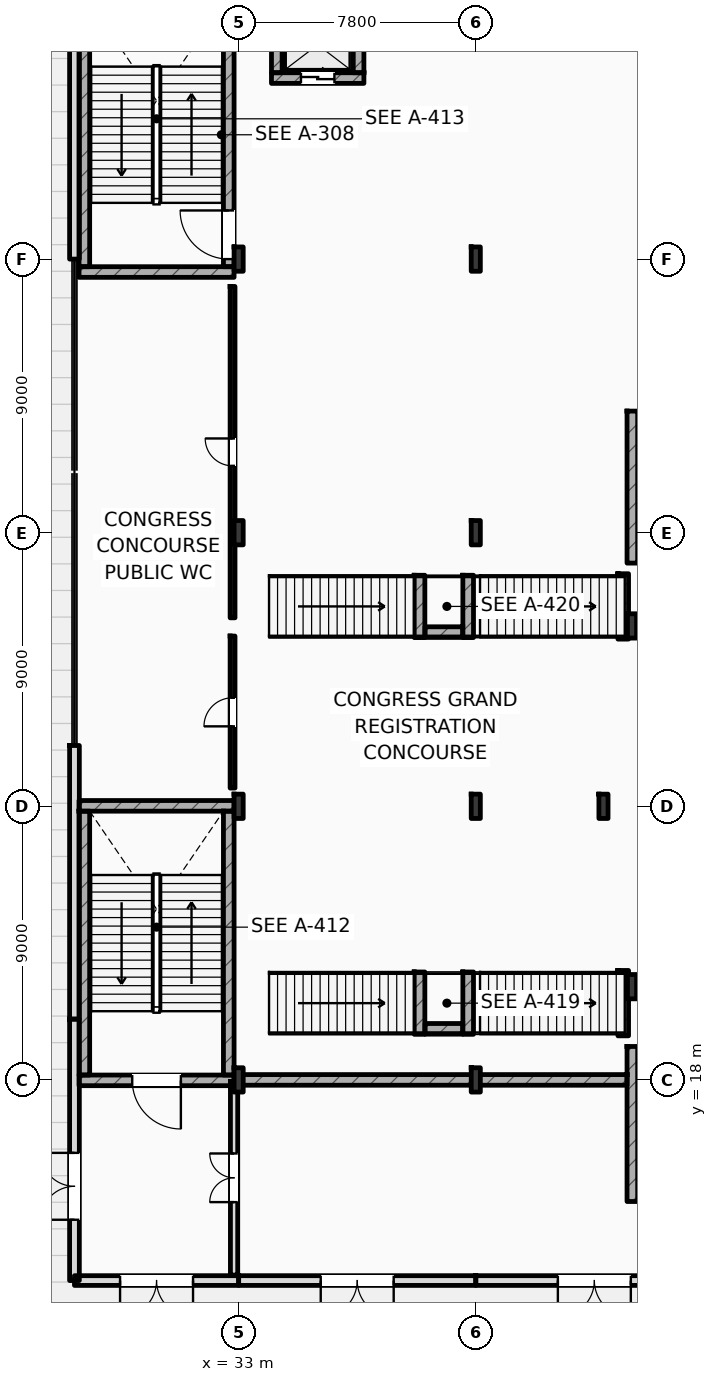
"""IFC4 building model, lengths in metres.
Left out: names, types, materials, properties, quantities, classifications, styles, units other than length and angle.
Written with IfcOpenShell. Run it as: python <this file> out.ifc"""

import sys

from ifc_helpers import new_model, si_unit, direction, frame, frame_2d, origin, origin_2d, place, context, subcontext, project, spatial, rectangle, i_section, extrude, element, fill, save


model = new_model("IFC4")
c1 = context("Model", 3, precision=1e-05, world=origin(), true_north=direction((0.0, 1.0)))
c2 = subcontext(c1, "Body", "Model", "MODEL_VIEW")
j1 = project(units=[si_unit("LENGTHUNIT", "METRE"), si_unit("PLANEANGLEUNIT", "RADIAN")], contexts=[c1])
p1 = place(None, origin())
s1 = spatial("IfcSite", under=j1, at=p1, CompositionType="ELEMENT")
p2 = place(p1, origin())
s2 = spatial("IfcBuilding", under=s1, at=p2, CompositionType="ELEMENT")
p3 = place(p2, origin())
s3 = spatial("IfcBuildingStorey", under=s2, at=p3, CompositionType="ELEMENT", Elevation=0.0)
for number, where, z_axis, x_axis in (
    (1, (33.0, 18.0, 0.0), (0.0, 0.0, 1.0), (1.0, 0.0, 0.0)),
    (2, (33.0, 27.0, 0.0), (0.0, 0.0, 1.0), (1.0, 0.0, 0.0)),
    (3, (33.0, 36.0, 0.0), (0.0, 0.0, 1.0), (1.0, 0.0, 0.0)),
    (4, (33.0, 45.0, 0.0), (0.0, 0.0, 1.0), (1.0, 0.0, 0.0)),
    (5, (40.8, 18.0, 0.0), (0.0, 0.0, 1.0), (1.0, 0.0, 0.0)),
    (6, (40.8, 27.0, 0.0), (0.0, 0.0, 1.0), (1.0, 0.0, 0.0)),
    (7, (40.8, 36.0, 0.0), (0.0, 0.0, 1.0), (1.0, 0.0, 0.0)),
    (8, (40.8, 45.0, 0.0), (0.0, 0.0, 1.0), (1.0, 0.0, 0.0)),
    (9, (45.94, 32.933, 0.0), (0.0, 0.0, 1.0), (1.0, 0.0, 0.0)),
    (10, (45.0, 27.0, 0.0), (0.0, 0.0, 1.0), (1.0, 0.0, 0.0)),
    (11, (45.94, 21.067, 0.0), (0.0, 0.0, 1.0), (1.0, 0.0, 0.0)),
):
    element("IfcColumn", number, at=place(p3, frame(where, z_axis=z_axis, x_axis=x_axis)), inside=s3, PredefinedType="COLUMN", context=c2, shape_type="SweptSolid", body=[
        extrude(i_section(OverallWidth=0.3, OverallDepth=0.8, WebThickness=0.018, FlangeThickness=0.033, FilletRadius=0.03, at=origin_2d()), origin(), (0.0, 0.0, 1.0), 6.0),
    ])
p4 = place(p3, frame((27.75, 27.015, 0.0), z_axis=(0.0, 0.0, 1.0), x_axis=(1.0, 0.0, 0.0)))
e12 = element("IfcWall", 12, at=p4, inside=s3, PredefinedType="SHEAR", context=c2, shape_type="SweptSolid", body=[
    extrude(rectangle(XDim=5.1, YDim=0.35, at=frame_2d((2.55, 0.0))), origin(), (0.0, 0.0, 1.0), 6.0),
])
p5 = place(p3, frame((27.75, 17.985, 0.0), z_axis=(0.0, 0.0, 1.0), x_axis=(1.0, 0.0, 0.0)))
e13 = element("IfcWall", 13, at=p5, inside=s3, PredefinedType="SHEAR", context=c2, shape_type="SweptSolid", body=[
    extrude(rectangle(XDim=5.1, YDim=0.35, at=frame_2d((2.55, 0.0))), origin(), (0.0, 0.0, 1.0), 6.0),
])
p6 = place(p5, frame((1.75, 0.0, 0.0)))
e14 = element("IfcOpeningElement", 14, at=p6, cuts=e13, PredefinedType="OPENING", context=c2, shape_type="SweptSolid", body=[
    extrude(rectangle(XDim=1.6, YDim=2.2, at=frame_2d((0.8, 1.1))), frame((0.0, 0.185, 0.0), z_axis=(0.0, -1.0, 0.0), x_axis=(1.0, 0.0, 0.0)), (0.0, 0.0, 1.0), 0.37),
])
for number, where, z_axis, x_axis in (
    (15, (27.925, 18.16, 0.0), (0.0, 0.0, 1.0), (0.0, 1.0, 0.0)),
    (16, (32.675, 18.16, 0.0), (0.0, 0.0, 1.0), (0.0, 1.0, 0.0)),
):
    element("IfcWall", number, at=place(p3, frame(where, z_axis=z_axis, x_axis=x_axis)), inside=s3, PredefinedType="SHEAR", context=c2, shape_type="SweptSolid", body=[
        extrude(rectangle(XDim=8.68, YDim=0.35, at=frame_2d((4.34, 0.0))), origin(), (0.0, 0.0, 1.0), 6.0),
    ])
p7 = place(p3, frame((27.75, 44.575, 0.0), z_axis=(0.0, 0.0, 1.0), x_axis=(1.0, 0.0, 0.0)))
e17 = element("IfcWall", 17, at=p7, inside=s3, PredefinedType="SHEAR", context=c2, shape_type="SweptSolid", body=[
    extrude(rectangle(XDim=5.1, YDim=0.35, at=frame_2d((2.55, 0.0))), origin(), (0.0, 0.0, 1.0), 6.0),
])
p8 = place(p3, frame((27.925, 44.75, 0.0), z_axis=(0.0, 0.0, 1.0), x_axis=(0.0, 1.0, 0.0)))
e18 = element("IfcWall", 18, at=p8, inside=s3, PredefinedType="SHEAR", context=c2, shape_type="SweptSolid", body=[
    extrude(rectangle(XDim=8.68, YDim=0.35, at=frame_2d((4.34, 0.0))), origin(), (0.0, 0.0, 1.0), 6.0),
])
p9 = place(p3, frame((32.675, 44.75, 0.0), z_axis=(0.0, 0.0, 1.0), x_axis=(0.0, 1.0, 0.0)))
e19 = element("IfcWall", 19, at=p9, inside=s3, PredefinedType="SHEAR", context=c2, shape_type="SweptSolid", body=[
    extrude(rectangle(XDim=8.68, YDim=0.35, at=frame_2d((4.34, 0.0))), origin(), (0.0, 0.0, 1.0), 6.0),
])
p10 = place(p9, frame((0.25, 0.0, 0.0)))
e20 = element("IfcOpeningElement", 20, at=p10, cuts=e19, PredefinedType="OPENING", context=c2, shape_type="SweptSolid", body=[
    extrude(rectangle(XDim=1.6, YDim=2.2, at=frame_2d((0.8, 1.1))), frame((0.0, 0.185, 0.0), z_axis=(0.0, -1.0, 0.0), x_axis=(1.0, 0.0, 0.0)), (0.0, 0.0, 1.0), 0.37),
])
p11 = place(p3, frame((45.95, 14.0, 0.0), z_axis=(0.0, 0.0, 1.0), x_axis=(0.0, 1.0, 0.0)))
e21 = element("IfcWall", 21, at=p11, inside=s3, PredefinedType="SHEAR", context=c2, shape_type="SweptSolid", body=[
    extrude(rectangle(XDim=5.1, YDim=0.35, at=frame_2d((2.55, 0.0))), origin(), (0.0, 0.0, 1.0), 5.7),
])
p12 = place(p3, frame((45.95, 35.0, 0.0), z_axis=(0.0, 0.0, 1.0), x_axis=(0.0, 1.0, 0.0)))
e22 = element("IfcWall", 22, at=p12, inside=s3, PredefinedType="SHEAR", context=c2, shape_type="SweptSolid", body=[
    extrude(rectangle(XDim=5.0, YDim=0.35, at=frame_2d((2.5, 0.0))), origin(), (0.0, 0.0, 1.0), 5.7),
])
p13 = place(p3, frame((33.0, 18.0, 0.0), z_axis=(0.0, 0.0, 1.0), x_axis=(1.0, 0.0, 0.0)))
e23 = element("IfcWall", 23, at=p13, inside=s3, PredefinedType="SHEAR", context=c2, shape_type="SweptSolid", body=[
    extrude(rectangle(XDim=12.775, YDim=0.35, at=frame_2d((6.387, 0.0))), origin(), (0.0, 0.0, 1.0), 5.7),
])
p14 = place(p3, frame((27.6, 11.4, 0.0), z_axis=(0.0, 0.0, 1.0), x_axis=(1.0, 0.0, 0.0)))
e24 = element("IfcWall", 24, at=p14, inside=s3, PredefinedType="STANDARD", context=c2, shape_type="SweptSolid", body=[
    extrude(rectangle(XDim=5.4, YDim=0.32, at=frame_2d((2.7, 0.0))), origin(), (0.0, 0.0, 1.0), 5.7),
])
p15 = place(p14, frame((1.5, 0.0, 0.0)))
e25 = element("IfcOpeningElement", 25, at=p15, cuts=e24, PredefinedType="OPENING", context=c2, shape_type="SweptSolid", body=[
    extrude(rectangle(XDim=2.4, YDim=2.6, at=frame_2d((1.2, 1.3))), frame((0.0, 0.17, 0.0), z_axis=(0.0, -1.0, 0.0), x_axis=(1.0, 0.0, 0.0)), (0.0, 0.0, 1.0), 0.34),
])
p16 = place(p3, frame((33.0, 11.4, 0.0), z_axis=(0.0, 0.0, 1.0), x_axis=(1.0, 0.0, 0.0)))
e26 = element("IfcWall", 26, at=p16, inside=s3, PredefinedType="STANDARD", context=c2, shape_type="SweptSolid", body=[
    extrude(rectangle(XDim=7.8, YDim=0.32, at=frame_2d((3.9, 0.0))), origin(), (0.0, 0.0, 1.0), 5.7),
])
p17 = place(p16, frame((2.7, 0.0, 0.0)))
e27 = element("IfcOpeningElement", 27, at=p17, cuts=e26, PredefinedType="OPENING", context=c2, shape_type="SweptSolid", body=[
    extrude(rectangle(XDim=2.4, YDim=2.6, at=frame_2d((1.2, 1.3))), frame((0.0, 0.17, 0.0), z_axis=(0.0, -1.0, 0.0), x_axis=(1.0, 0.0, 0.0)), (0.0, 0.0, 1.0), 0.34),
])
p18 = place(p3, frame((40.8, 11.4, 0.0), z_axis=(0.0, 0.0, 1.0), x_axis=(1.0, 0.0, 0.0)))
e28 = element("IfcWall", 28, at=p18, inside=s3, PredefinedType="STANDARD", context=c2, shape_type="SweptSolid", body=[
    extrude(rectangle(XDim=7.8, YDim=0.32, at=frame_2d((3.9, 0.0))), origin(), (0.0, 0.0, 1.0), 5.7),
])
p19 = place(p18, frame((2.7, 0.0, 0.0)))
e29 = element("IfcOpeningElement", 29, at=p19, cuts=e28, PredefinedType="OPENING", context=c2, shape_type="SweptSolid", body=[
    extrude(rectangle(XDim=2.4, YDim=2.6, at=frame_2d((1.2, 1.3))), frame((0.0, 0.17, 0.0), z_axis=(0.0, -1.0, 0.0), x_axis=(1.0, 0.0, 0.0)), (0.0, 0.0, 1.0), 0.34),
])
p20 = place(p3, frame((27.6, 11.4, 0.0), z_axis=(0.0, 0.0, 1.0), x_axis=(0.0, 1.0, 0.0)))
e30 = element("IfcWall", 30, at=p20, inside=s3, PredefinedType="STANDARD", context=c2, shape_type="SweptSolid", body=[
    extrude(rectangle(XDim=8.6, YDim=0.32, at=frame_2d((4.3, 0.0))), origin(), (0.0, 0.0, 1.0), 5.36),
])
p21 = place(p20, frame((2.0, 0.0, 0.0)))
e31 = element("IfcOpeningElement", 31, at=p21, cuts=e30, PredefinedType="OPENING", context=c2, shape_type="SweptSolid", body=[
    extrude(rectangle(XDim=2.2, YDim=2.5, at=frame_2d((1.1, 1.25))), frame((0.0, 0.17, 0.0), z_axis=(0.0, -1.0, 0.0), x_axis=(1.0, 0.0, 0.0)), (0.0, 0.0, 1.0), 0.34),
])
p22 = place(p3, frame((27.6, 20.0, 0.0), z_axis=(0.0, 0.0, 1.0), x_axis=(0.0, 1.0, 0.0)))
e32 = element("IfcWall", 32, at=p22, inside=s3, PredefinedType="STANDARD", context=c2, shape_type="SweptSolid", body=[
    extrude(rectangle(XDim=9.0, YDim=0.32, at=frame_2d((4.5, 0.0))), origin(), (0.0, 0.0, 1.0), 5.36),
])
p23 = place(p3, frame((27.6, 45.0, 0.0), z_axis=(0.0, 0.0, 1.0), x_axis=(0.0, 1.0, 0.0)))
e33 = element("IfcWall", 33, at=p23, inside=s3, PredefinedType="STANDARD", context=c2, shape_type="SweptSolid", body=[
    extrude(rectangle(XDim=9.0, YDim=0.32, at=frame_2d((4.5, 0.0))), origin(), (0.0, 0.0, 1.0), 5.7),
])
for number, where, z_axis, x_axis in (
    (34, (38.95, 19.5, 0.0), (0.0, 0.0, 1.0), (0.0, 1.0, 0.0)),
    (35, (40.55, 19.5, 0.0), (0.0, 0.0, 1.0), (0.0, 1.0, 0.0)),
):
    element("IfcWall", number, at=place(p3, frame(where, z_axis=z_axis, x_axis=x_axis)), inside=s3, PredefinedType="SHEAR", context=c2, shape_type="SweptSolid", body=[
        extrude(rectangle(XDim=2.05, YDim=0.35, at=frame_2d((1.025, 0.0))), origin(), (0.0, 0.0, 1.0), 2.8),
    ])
p24 = place(p3, frame((39.13, 19.68, 0.0), z_axis=(0.0, 0.0, 1.0), x_axis=(1.0, 0.0, 0.0)))
e36 = element("IfcWall", 36, at=p24, inside=s3, PredefinedType="SHEAR", context=c2, shape_type="SweptSolid", body=[
    extrude(rectangle(XDim=1.24, YDim=0.35, at=frame_2d((0.62, 0.0))), origin(), (0.0, 0.0, 1.0), 2.8),
])
p25 = place(p3, frame((45.65, 19.45, 0.0), z_axis=(0.0, 0.0, 1.0), x_axis=(0.0, 1.0, 0.0)))
e37 = element("IfcWall", 37, at=p25, inside=s3, PredefinedType="SHEAR", context=c2, shape_type="SweptSolid", body=[
    extrude(rectangle(XDim=2.15, YDim=0.35, at=frame_2d((1.075, 0.0))), origin(), (0.0, 0.0, 1.0), 5.7),
])
for number, where, z_axis, x_axis in (
    (38, (38.95, 32.55, 0.0), (0.0, 0.0, 1.0), (0.0, 1.0, 0.0)),
    (39, (40.55, 32.55, 0.0), (0.0, 0.0, 1.0), (0.0, 1.0, 0.0)),
):
    element("IfcWall", number, at=place(p3, frame(where, z_axis=z_axis, x_axis=x_axis)), inside=s3, PredefinedType="SHEAR", context=c2, shape_type="SweptSolid", body=[
        extrude(rectangle(XDim=2.05, YDim=0.35, at=frame_2d((1.025, 0.0))), origin(), (0.0, 0.0, 1.0), 2.8),
    ])
p26 = place(p3, frame((39.13, 32.73, 0.0), z_axis=(0.0, 0.0, 1.0), x_axis=(1.0, 0.0, 0.0)))
e40 = element("IfcWall", 40, at=p26, inside=s3, PredefinedType="SHEAR", context=c2, shape_type="SweptSolid", body=[
    extrude(rectangle(XDim=1.24, YDim=0.35, at=frame_2d((0.62, 0.0))), origin(), (0.0, 0.0, 1.0), 2.8),
])
p27 = place(p3, frame((45.65, 32.5, 0.0), z_axis=(0.0, 0.0, 1.0), x_axis=(0.0, 1.0, 0.0)))
e41 = element("IfcWall", 41, at=p27, inside=s3, PredefinedType="SHEAR", context=c2, shape_type="SweptSolid", body=[
    extrude(rectangle(XDim=2.15, YDim=0.35, at=frame_2d((1.075, 0.0))), origin(), (0.0, 0.0, 1.0), 5.7),
])
p28 = place(p3, frame((34.08, 50.955, 0.0), z_axis=(0.0, 0.0, 1.0), x_axis=(1.0, 0.0, 0.0)))
e42 = element("IfcWall", 42, at=p28, inside=s3, PredefinedType="SHEAR", context=c2, shape_type="SweptSolid", body=[
    extrude(rectangle(XDim=3.04, YDim=0.35, at=frame_2d((1.52, 0.0))), origin(), (0.0, 0.0, 1.0), 5.7),
])
p29 = place(p28, frame((0.97, 0.0, 0.0)))
e43 = element("IfcOpeningElement", 43, at=p29, cuts=e42, PredefinedType="OPENING", context=c2, shape_type="SweptSolid", body=[
    extrude(rectangle(XDim=1.1, YDim=2.2, at=frame_2d((0.55, 1.1))), frame((0.0, 0.185, 0.0), z_axis=(0.0, -1.0, 0.0), x_axis=(1.0, 0.0, 0.0)), (0.0, 0.0, 1.0), 0.37),
])
for number, where, z_axis, x_axis in (
    (44, (34.255, 51.13, 0.0), (0.0, 0.0, 1.0), (0.0, 1.0, 0.0)),
    (45, (36.945, 51.13, 0.0), (0.0, 0.0, 1.0), (0.0, 1.0, 0.0)),
):
    element("IfcWall", number, at=place(p3, frame(where, z_axis=z_axis, x_axis=x_axis)), inside=s3, PredefinedType="SHEAR", context=c2, shape_type="SweptSolid", body=[
        extrude(rectangle(XDim=1.84, YDim=0.35, at=frame_2d((0.92, 0.0))), origin(), (0.0, 0.0, 1.0), 5.7),
    ])
p30 = place(p3, frame((32.8, 27.6, 0.0), z_axis=(0.0, 0.0, 1.0), x_axis=(0.0, 1.0, 0.0)))
e46 = element("IfcWall", 46, at=p30, inside=s3, PredefinedType="PARTITIONING", context=c2, shape_type="SweptSolid", body=[
    extrude(rectangle(XDim=5.0, YDim=0.16, at=frame_2d((2.5, 0.0))), origin(), (0.0, 0.0, 1.0), 5.2),
])
p31 = place(p30, frame((2.03, 0.0, 0.0)))
e47 = element("IfcOpeningElement", 47, at=p31, cuts=e46, PredefinedType="OPENING", context=c2, shape_type="SweptSolid", body=[
    extrude(rectangle(XDim=0.94, YDim=2.15, at=frame_2d((0.47, 1.075))), frame((0.0, 0.09, 0.0), z_axis=(0.0, -1.0, 0.0), x_axis=(1.0, 0.0, 0.0)), (0.0, 0.0, 1.0), 0.18),
])
p32 = place(p3, frame((32.8, 33.2, 0.0), z_axis=(0.0, 0.0, 1.0), x_axis=(0.0, 1.0, 0.0)))
e48 = element("IfcWall", 48, at=p32, inside=s3, PredefinedType="PARTITIONING", context=c2, shape_type="SweptSolid", body=[
    extrude(rectangle(XDim=10.9, YDim=0.16, at=frame_2d((5.45, 0.0))), origin(), (0.0, 0.0, 1.0), 5.2),
])
p33 = place(p32, frame((5.0, 0.0, 0.0)))
e49 = element("IfcOpeningElement", 49, at=p33, cuts=e48, PredefinedType="OPENING", context=c2, shape_type="SweptSolid", body=[
    extrude(rectangle(XDim=0.9, YDim=2.1, at=frame_2d((0.45, 1.05))), frame((0.0, 0.09, 0.0), z_axis=(0.0, -1.0, 0.0), x_axis=(1.0, 0.0, 0.0)), (0.0, 0.0, 1.0), 0.18),
])
p34 = place(p3, frame((32.85, 11.58, 0.0), z_axis=(0.0, 0.0, 1.0), x_axis=(0.0, 1.0, 0.0)))
e50 = element("IfcWall", 50, at=p34, inside=s3, PredefinedType="STANDARD", context=c2, shape_type="SweptSolid", body=[
    extrude(rectangle(XDim=6.37, YDim=0.24, at=frame_2d((3.185, 0.0))), origin(), (0.0, 0.0, 1.0), 5.2),
])
p35 = place(p34, frame((2.4, 0.0, 0.0)))
e51 = element("IfcOpeningElement", 51, at=p35, cuts=e50, PredefinedType="OPENING", context=c2, shape_type="SweptSolid", body=[
    extrude(rectangle(XDim=1.6, YDim=2.2, at=frame_2d((0.8, 1.1))), frame((0.0, 0.13, 0.0), z_axis=(0.0, -1.0, 0.0), x_axis=(1.0, 0.0, 0.0)), (0.0, 0.0, 1.0), 0.26),
])
p36 = place(p15, frame((2.4, 0.0, 0.0), z_axis=(0.0, 0.0, 1.0), x_axis=(-1.0, 0.0, 0.0)))
e52 = element("IfcDoor", 52, at=p36, inside=s3, OperationType="DOUBLE_SWING_LEFT", PredefinedType="DOOR", context=c2, shape_type="SweptSolid", body=[
    extrude(rectangle(XDim=2.4, YDim=2.6, at=frame_2d((1.2, 1.3))), frame((0.0, 0.025, 0.0), z_axis=(0.0, -1.0, 0.0), x_axis=(1.0, 0.0, 0.0)), (0.0, 0.0, 1.0), 0.05),
])
fill(e25, e52)
p37 = place(p17, frame((2.4, 0.0, 0.0), z_axis=(0.0, 0.0, 1.0), x_axis=(-1.0, 0.0, 0.0)))
e53 = element("IfcDoor", 53, at=p37, inside=s3, OperationType="DOUBLE_SWING_LEFT", PredefinedType="DOOR", context=c2, shape_type="SweptSolid", body=[
    extrude(rectangle(XDim=2.4, YDim=2.6, at=frame_2d((1.2, 1.3))), frame((0.0, 0.025, 0.0), z_axis=(0.0, -1.0, 0.0), x_axis=(1.0, 0.0, 0.0)), (0.0, 0.0, 1.0), 0.05),
])
fill(e27, e53)
p38 = place(p19, frame((2.4, 0.0, 0.0), z_axis=(0.0, 0.0, 1.0), x_axis=(-1.0, 0.0, 0.0)))
e54 = element("IfcDoor", 54, at=p38, inside=s3, OperationType="DOUBLE_SWING_LEFT", PredefinedType="DOOR", context=c2, shape_type="SweptSolid", body=[
    extrude(rectangle(XDim=2.4, YDim=2.6, at=frame_2d((1.2, 1.3))), frame((0.0, 0.025, 0.0), z_axis=(0.0, -1.0, 0.0), x_axis=(1.0, 0.0, 0.0)), (0.0, 0.0, 1.0), 0.05),
])
fill(e29, e54)
p39 = place(p21, origin())
e55 = element("IfcDoor", 55, at=p39, inside=s3, OperationType="DOUBLE_SWING_LEFT", PredefinedType="DOOR", context=c2, shape_type="SweptSolid", body=[
    extrude(rectangle(XDim=2.2, YDim=2.5, at=frame_2d((1.1, 1.25))), frame((0.0, 0.025, 0.0), z_axis=(0.0, -1.0, 0.0), x_axis=(1.0, 0.0, 0.0)), (0.0, 0.0, 1.0), 0.05),
])
fill(e31, e55)
p40 = place(p6, frame((1.6, 0.0, 0.0), z_axis=(0.0, 0.0, 1.0), x_axis=(-1.0, 0.0, 0.0)))
e56 = element("IfcDoor", 56, at=p40, inside=s3, OperationType="SINGLE_SWING_RIGHT", PredefinedType="DOOR", context=c2, shape_type="SweptSolid", body=[
    extrude(rectangle(XDim=1.6, YDim=2.2, at=frame_2d((0.8, 1.1))), frame((0.0, 0.025, 0.0), z_axis=(0.0, -1.0, 0.0), x_axis=(1.0, 0.0, 0.0)), (0.0, 0.0, 1.0), 0.05),
])
fill(e14, e56)
p41 = place(p10, origin())
e57 = element("IfcDoor", 57, at=p41, inside=s3, OperationType="SINGLE_SWING_RIGHT", PredefinedType="DOOR", context=c2, shape_type="SweptSolid", body=[
    extrude(rectangle(XDim=1.6, YDim=2.2, at=frame_2d((0.8, 1.1))), frame((0.0, 0.025, 0.0), z_axis=(0.0, -1.0, 0.0), x_axis=(1.0, 0.0, 0.0)), (0.0, 0.0, 1.0), 0.05),
])
fill(e20, e57)
p42 = place(p29, origin())
e58 = element("IfcDoor", 58, at=p42, inside=s3, OperationType="SLIDING_TO_LEFT", PredefinedType="DOOR", context=c2, shape_type="SweptSolid", body=[
    extrude(rectangle(XDim=1.1, YDim=2.2, at=frame_2d((0.55, 1.1))), frame((0.0, 0.025, 0.0), z_axis=(0.0, -1.0, 0.0), x_axis=(1.0, 0.0, 0.0)), (0.0, 0.0, 1.0), 0.05),
])
fill(e43, e58)
p43 = place(p31, origin())
e59 = element("IfcDoor", 59, at=p43, inside=s3, OperationType="SINGLE_SWING_LEFT", PredefinedType="DOOR", context=c2, shape_type="SweptSolid", body=[
    extrude(rectangle(XDim=0.94, YDim=2.15, at=frame_2d((0.47, 1.075))), frame((0.0, 0.025, 0.0), z_axis=(0.0, -1.0, 0.0), x_axis=(1.0, 0.0, 0.0)), (0.0, 0.0, 1.0), 0.05),
])
fill(e47, e59)
p44 = place(p33, origin())
e60 = element("IfcDoor", 60, at=p44, inside=s3, OperationType="SINGLE_SWING_RIGHT", PredefinedType="DOOR", context=c2, shape_type="SweptSolid", body=[
    extrude(rectangle(XDim=0.9, YDim=2.1, at=frame_2d((0.45, 1.05))), frame((0.0, 0.025, 0.0), z_axis=(0.0, -1.0, 0.0), x_axis=(1.0, 0.0, 0.0)), (0.0, 0.0, 1.0), 0.05),
])
fill(e49, e60)
p45 = place(p35, origin())
e61 = element("IfcDoor", 61, at=p45, inside=s3, OperationType="DOUBLE_SWING_LEFT", PredefinedType="DOOR", context=c2, shape_type="SweptSolid", body=[
    extrude(rectangle(XDim=1.6, YDim=2.2, at=frame_2d((0.8, 1.1))), frame((0.0, 0.025, 0.0), z_axis=(0.0, -1.0, 0.0), x_axis=(1.0, 0.0, 0.0)), (0.0, 0.0, 1.0), 0.05),
])
fill(e51, e61)
save(model, sys.argv[1])
